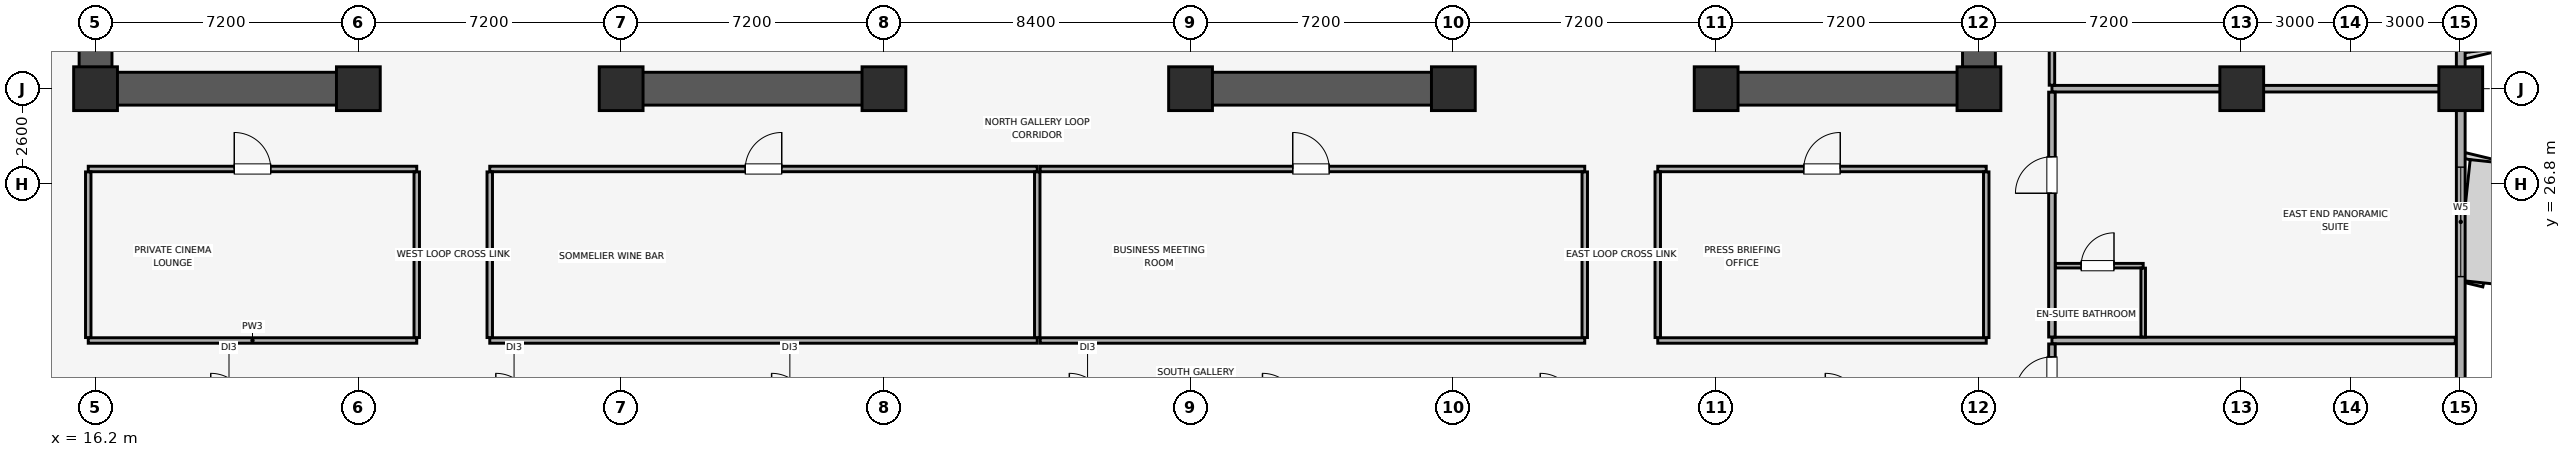
"""IFC4 building model, lengths in metres.
Left out: names, types, materials, properties, quantities, classifications, styles, units other than length and angle.
Written with IfcOpenShell. Run it as: python <this file> out.ifc"""

import sys

from ifc_helpers import new_model, si_unit, direction, frame, frame_2d, origin, origin_2d, place, context, subcontext, project, spatial, rectangle, extrude, element, fill, save


model = new_model("IFC4")
c1 = context("Model", 3, precision=1e-05, world=origin(), true_north=direction((0.0, 1.0)))
c2 = subcontext(c1, "Body", "Model", "MODEL_VIEW")
j1 = project(units=[si_unit("LENGTHUNIT", "METRE"), si_unit("PLANEANGLEUNIT", "RADIAN")], contexts=[c1])
p1 = place(None, origin())
s1 = spatial("IfcSite", under=j1, at=p1, CompositionType="ELEMENT")
p2 = place(p1, origin())
s2 = spatial("IfcBuilding", under=s1, at=p2, CompositionType="ELEMENT")
p3 = place(p2, frame((0.0, 0.0, 180.95)))
s3 = spatial("IfcBuildingStorey", under=s2, at=p3, CompositionType="ELEMENT", Elevation=180.95)
for number, where, z_axis, x_axis in (
    (1, (81.0, 29.4, 0.0), (0.0, 0.0, 1.0), (1.0, 0.0, 0.0)),
    (2, (16.2, 29.4, 0.0), (0.0, 0.0, 1.0), (1.0, 0.0, 0.0)),
    (3, (23.4, 29.4, 0.0), (0.0, 0.0, 1.0), (1.0, 0.0, 0.0)),
    (4, (30.6, 29.4, 0.0), (0.0, 0.0, 1.0), (1.0, 0.0, 0.0)),
    (5, (37.8, 29.4, 0.0), (0.0, 0.0, 1.0), (1.0, 0.0, 0.0)),
    (6, (46.2, 29.4, 0.0), (0.0, 0.0, 1.0), (1.0, 0.0, 0.0)),
    (7, (53.4, 29.4, 0.0), (0.0, 0.0, 1.0), (1.0, 0.0, 0.0)),
    (8, (60.6, 29.4, 0.0), (0.0, 0.0, 1.0), (1.0, 0.0, 0.0)),
    (9, (67.8, 29.4, 0.0), (0.0, 0.0, 1.0), (1.0, 0.0, 0.0)),
    (10, (75.0, 29.4, 0.0), (0.0, 0.0, 1.0), (1.0, 0.0, 0.0)),
):
    element("IfcColumn", number, at=place(p3, frame(where, z_axis=z_axis, x_axis=x_axis)), inside=s3, PredefinedType="COLUMN", context=c2, shape_type="SweptSolid", body=[
        extrude(rectangle(XDim=1.2, YDim=1.2, at=origin_2d()), origin(), (0.0, 0.0, 1.0), 3.45),
    ])
p4 = place(p3, frame((81.0, 7.0, 0.0), z_axis=(0.0, 0.0, 1.0), x_axis=(0.0, 1.0, 0.0)))
e11 = element("IfcWall", 11, at=p4, inside=s3, PredefinedType="SOLIDWALL", context=c2, shape_type="SweptSolid", body=[
    extrude(rectangle(XDim=38.0, YDim=0.24, at=frame_2d((19.0, 0.0))), origin(), (0.0, 0.0, 1.0), 2.65),
])
p5 = place(p4, frame((2.5, 0.0, 0.85)))
e12 = element("IfcOpeningElement", 12, at=p5, cuts=e11, PredefinedType="OPENING", context=c2, shape_type="SweptSolid", body=[
    extrude(rectangle(XDim=3.0, YDim=1.5, at=frame_2d((1.5, 0.75))), frame((0.0, 0.13, 0.0), z_axis=(0.0, -1.0, 0.0), x_axis=(1.0, 0.0, 0.0)), (0.0, 0.0, 1.0), 0.26),
])
p6 = place(p4, frame((10.45, 0.0, 0.85)))
e13 = element("IfcOpeningElement", 13, at=p6, cuts=e11, PredefinedType="OPENING", context=c2, shape_type="SweptSolid", body=[
    extrude(rectangle(XDim=3.0, YDim=1.5, at=frame_2d((1.5, 0.75))), frame((0.0, 0.13, 0.0), z_axis=(0.0, -1.0, 0.0), x_axis=(1.0, 0.0, 0.0)), (0.0, 0.0, 1.0), 0.26),
])
p7 = place(p4, frame((17.25, 0.0, 0.85)))
e14 = element("IfcOpeningElement", 14, at=p7, cuts=e11, PredefinedType="OPENING", context=c2, shape_type="SweptSolid", body=[
    extrude(rectangle(XDim=3.0, YDim=1.5, at=frame_2d((1.5, 0.75))), frame((0.0, 0.13, 0.0), z_axis=(0.0, -1.0, 0.0), x_axis=(1.0, 0.0, 0.0)), (0.0, 0.0, 1.0), 0.26),
])
p8 = place(p4, frame((23.615, 0.0, 0.85)))
e15 = element("IfcOpeningElement", 15, at=p8, cuts=e11, PredefinedType="OPENING", context=c2, shape_type="SweptSolid", body=[
    extrude(rectangle(XDim=3.0, YDim=1.5, at=frame_2d((1.5, 0.75))), frame((0.0, 0.13, 0.0), z_axis=(0.0, -1.0, 0.0), x_axis=(1.0, 0.0, 0.0)), (0.0, 0.0, 1.0), 0.26),
])
p9 = place(p4, frame((28.385, 0.0, 0.85)))
e16 = element("IfcOpeningElement", 16, at=p9, cuts=e11, PredefinedType="OPENING", context=c2, shape_type="SweptSolid", body=[
    extrude(rectangle(XDim=3.0, YDim=1.5, at=frame_2d((1.5, 0.75))), frame((0.0, 0.13, 0.0), z_axis=(0.0, -1.0, 0.0), x_axis=(1.0, 0.0, 0.0)), (0.0, 0.0, 1.0), 0.26),
])
p10 = place(p4, frame((33.915, 0.0, 0.85)))
e17 = element("IfcOpeningElement", 17, at=p10, cuts=e11, PredefinedType="OPENING", context=c2, shape_type="SweptSolid", body=[
    extrude(rectangle(XDim=3.0, YDim=1.5, at=frame_2d((1.5, 0.75))), frame((0.0, 0.13, 0.0), z_axis=(0.0, -1.0, 0.0), x_axis=(1.0, 0.0, 0.0)), (0.0, 0.0, 1.0), 0.26),
])
for number, where, z_axis, x_axis in (
    (18, (16.2, 29.4, 0.0), (0.0, 0.0, 1.0), (0.0, 1.0, 0.0)),
    (19, (67.8, 29.4, 0.0), (0.0, 0.0, 1.0), (0.0, 1.0, 0.0)),
):
    element("IfcWall", number, at=place(p3, frame(where, z_axis=z_axis, x_axis=x_axis)), inside=s3, PredefinedType="SHEAR", context=c2, shape_type="SweptSolid", body=[
        extrude(rectangle(XDim=19.2, YDim=0.9, at=frame_2d((9.6, 0.0))), origin(), (0.0, 0.0, 1.0), 3.45),
    ])
p11 = place(p3, frame((16.655, 29.4, 0.0), z_axis=(0.0, 0.0, 1.0), x_axis=(1.0, 0.0, 0.0)))
e20 = element("IfcWall", 20, at=p11, inside=s3, PredefinedType="SHEAR", context=c2, shape_type="SweptSolid", body=[
    extrude(rectangle(XDim=6.945, YDim=0.9, at=frame_2d((3.473, 0.0))), origin(), (0.0, 0.0, 1.0), 3.45),
])
for number, where, z_axis, x_axis in (
    (21, (30.4, 29.4, 0.0), (0.0, 0.0, 1.0), (1.0, 0.0, 0.0)),
    (22, (46.0, 29.4, 0.0), (0.0, 0.0, 1.0), (1.0, 0.0, 0.0)),
):
    element("IfcWall", number, at=place(p3, frame(where, z_axis=z_axis, x_axis=x_axis)), inside=s3, PredefinedType="SHEAR", context=c2, shape_type="SweptSolid", body=[
        extrude(rectangle(XDim=7.6, YDim=0.9, at=frame_2d((3.8, 0.0))), origin(), (0.0, 0.0, 1.0), 3.45),
    ])
p12 = place(p3, frame((60.4, 29.4, 0.0), z_axis=(0.0, 0.0, 1.0), x_axis=(1.0, 0.0, 0.0)))
e23 = element("IfcWall", 23, at=p12, inside=s3, PredefinedType="SHEAR", context=c2, shape_type="SweptSolid", body=[
    extrude(rectangle(XDim=6.945, YDim=0.9, at=frame_2d((3.473, 0.0))), origin(), (0.0, 0.0, 1.0), 3.45),
])
p13 = place(p3, frame((69.8, 22.5, 0.0), z_axis=(0.0, 0.0, 1.0), x_axis=(1.0, 0.0, 0.0)))
e24 = element("IfcWall", 24, at=p13, inside=s3, PredefinedType="PARTITIONING", context=c2, shape_type="SweptSolid", body=[
    extrude(rectangle(XDim=11.05, YDim=0.18, at=frame_2d((5.525, 0.0))), origin(), (0.0, 0.0, 1.0), 3.45),
])
p14 = place(p3, frame((69.8, 20.695, 0.0), z_axis=(0.0, 0.0, 1.0), x_axis=(0.0, 1.0, 0.0)))
e25 = element("IfcWall", 25, at=p14, inside=s3, PredefinedType="PARTITIONING", context=c2, shape_type="SweptSolid", body=[
    extrude(rectangle(XDim=1.71, YDim=0.18, at=frame_2d((0.855, 0.0))), origin(), (0.0, 0.0, 1.0), 3.45),
])
p15 = place(p14, frame((0.355, 0.0, 0.0)))
e26 = element("IfcOpeningElement", 26, at=p15, cuts=e25, PredefinedType="OPENING", context=c2, shape_type="SweptSolid", body=[
    extrude(rectangle(XDim=1.0, YDim=2.15, at=frame_2d((0.5, 1.075))), frame((0.0, 0.1, 0.0), z_axis=(0.0, -1.0, 0.0), x_axis=(1.0, 0.0, 0.0)), (0.0, 0.0, 1.0), 0.2),
])
p16 = place(p3, frame((69.8, 29.4, 0.0), z_axis=(0.0, 0.0, 1.0), x_axis=(1.0, 0.0, 0.0)))
e27 = element("IfcWall", 27, at=p16, inside=s3, PredefinedType="PARTITIONING", context=c2, shape_type="SweptSolid", body=[
    extrude(rectangle(XDim=11.05, YDim=0.18, at=frame_2d((5.525, 0.0))), origin(), (0.0, 0.0, 1.0), 2.54),
])
p17 = place(p3, frame((69.8, 22.595, 0.0), z_axis=(0.0, 0.0, 1.0), x_axis=(0.0, 1.0, 0.0)))
e28 = element("IfcWall", 28, at=p17, inside=s3, PredefinedType="PARTITIONING", context=c2, shape_type="SweptSolid", body=[
    extrude(rectangle(XDim=6.71, YDim=0.18, at=frame_2d((3.355, 0.0))), origin(), (0.0, 0.0, 1.0), 3.45),
])
p18 = place(p17, frame((3.94, 0.0, 0.0)))
e29 = element("IfcOpeningElement", 29, at=p18, cuts=e28, PredefinedType="OPENING", context=c2, shape_type="SweptSolid", body=[
    extrude(rectangle(XDim=1.0, YDim=2.15, at=frame_2d((0.5, 1.075))), frame((0.0, 0.1, 0.0), z_axis=(0.0, -1.0, 0.0), x_axis=(1.0, 0.0, 0.0)), (0.0, 0.0, 1.0), 0.2),
])
p19 = place(p3, frame((69.895, 24.55, 0.0), z_axis=(0.0, 0.0, 1.0), x_axis=(1.0, 0.0, 0.0)))
e30 = element("IfcWall", 30, at=p19, inside=s3, PredefinedType="PARTITIONING", context=c2, shape_type="SweptSolid", body=[
    extrude(rectangle(XDim=2.405, YDim=0.125, at=frame_2d((1.203, 0.0))), origin(), (0.0, 0.0, 1.0), 3.45),
])
p20 = place(p19, frame((0.705, 0.0, 0.0)))
e31 = element("IfcOpeningElement", 31, at=p20, cuts=e30, PredefinedType="OPENING", context=c2, shape_type="SweptSolid", body=[
    extrude(rectangle(XDim=0.9, YDim=2.1, at=frame_2d((0.45, 1.05))), frame((0.0, 0.073, 0.0), z_axis=(0.0, -1.0, 0.0), x_axis=(1.0, 0.0, 0.0)), (0.0, 0.0, 1.0), 0.145),
])
p21 = place(p3, frame((72.3, 22.595, 0.0), z_axis=(0.0, 0.0, 1.0), x_axis=(0.0, 1.0, 0.0)))
e32 = element("IfcWall", 32, at=p21, inside=s3, PredefinedType="PARTITIONING", context=c2, shape_type="SweptSolid", body=[
    extrude(rectangle(XDim=1.887, YDim=0.125, at=frame_2d((0.944, 0.0))), origin(), (0.0, 0.0, 1.0), 3.45),
])
p22 = place(p3, frame((16.0, 22.5, 0.0), z_axis=(0.0, 0.0, 1.0), x_axis=(1.0, 0.0, 0.0)))
e33 = element("IfcWall", 33, at=p22, inside=s3, PredefinedType="PARTITIONING", context=c2, shape_type="SweptSolid", body=[
    extrude(rectangle(XDim=9.0, YDim=0.15, at=frame_2d((4.5, 0.0))), origin(), (0.0, 0.0, 1.0), 3.45),
])
p23 = place(p3, frame((16.0, 27.2, 0.0), z_axis=(0.0, 0.0, 1.0), x_axis=(1.0, 0.0, 0.0)))
e34 = element("IfcWall", 34, at=p23, inside=s3, PredefinedType="PARTITIONING", context=c2, shape_type="SweptSolid", body=[
    extrude(rectangle(XDim=9.0, YDim=0.15, at=frame_2d((4.5, 0.0))), origin(), (0.0, 0.0, 1.0), 3.45),
])
p24 = place(p23, frame((4.0, 0.0, 0.0)))
e35 = element("IfcOpeningElement", 35, at=p24, cuts=e34, PredefinedType="OPENING", context=c2, shape_type="SweptSolid", body=[
    extrude(rectangle(XDim=1.0, YDim=2.15, at=frame_2d((0.5, 1.075))), frame((0.0, 0.085, 0.0), z_axis=(0.0, -1.0, 0.0), x_axis=(1.0, 0.0, 0.0)), (0.0, 0.0, 1.0), 0.17),
])
p25 = place(p3, frame((16.0, 22.58, 0.0), z_axis=(0.0, 0.0, 1.0), x_axis=(0.0, 1.0, 0.0)))
e36 = element("IfcWall", 36, at=p25, inside=s3, PredefinedType="PARTITIONING", context=c2, shape_type="SweptSolid", body=[
    extrude(rectangle(XDim=4.54, YDim=0.15, at=frame_2d((2.27, 0.0))), origin(), (0.0, 0.0, 1.0), 2.95),
])
p26 = place(p3, frame((25.0, 22.58, 0.0), z_axis=(0.0, 0.0, 1.0), x_axis=(0.0, 1.0, 0.0)))
e37 = element("IfcWall", 37, at=p26, inside=s3, PredefinedType="PARTITIONING", context=c2, shape_type="SweptSolid", body=[
    extrude(rectangle(XDim=4.54, YDim=0.15, at=frame_2d((2.27, 0.0))), origin(), (0.0, 0.0, 1.0), 3.45),
])
p27 = place(p3, frame((27.0, 22.5, 0.0), z_axis=(0.0, 0.0, 1.0), x_axis=(1.0, 0.0, 0.0)))
e38 = element("IfcWall", 38, at=p27, inside=s3, PredefinedType="PARTITIONING", context=c2, shape_type="SweptSolid", body=[
    extrude(rectangle(XDim=15.0, YDim=0.15, at=frame_2d((7.5, 0.0))), origin(), (0.0, 0.0, 1.0), 3.45),
])
p28 = place(p3, frame((27.0, 27.2, 0.0), z_axis=(0.0, 0.0, 1.0), x_axis=(1.0, 0.0, 0.0)))
e39 = element("IfcWall", 39, at=p28, inside=s3, PredefinedType="PARTITIONING", context=c2, shape_type="SweptSolid", body=[
    extrude(rectangle(XDim=15.0, YDim=0.15, at=frame_2d((7.5, 0.0))), origin(), (0.0, 0.0, 1.0), 3.45),
])
p29 = place(p28, frame((7.0, 0.0, 0.0)))
e40 = element("IfcOpeningElement", 40, at=p29, cuts=e39, PredefinedType="OPENING", context=c2, shape_type="SweptSolid", body=[
    extrude(rectangle(XDim=1.0, YDim=2.15, at=frame_2d((0.5, 1.075))), frame((0.0, 0.085, 0.0), z_axis=(0.0, -1.0, 0.0), x_axis=(1.0, 0.0, 0.0)), (0.0, 0.0, 1.0), 0.17),
])
for number, where, z_axis, x_axis in (
    (41, (27.0, 22.58, 0.0), (0.0, 0.0, 1.0), (0.0, 1.0, 0.0)),
    (42, (42.0, 22.58, 0.0), (0.0, 0.0, 1.0), (0.0, 1.0, 0.0)),
):
    element("IfcWall", number, at=place(p3, frame(where, z_axis=z_axis, x_axis=x_axis)), inside=s3, PredefinedType="PARTITIONING", context=c2, shape_type="SweptSolid", body=[
        extrude(rectangle(XDim=4.54, YDim=0.15, at=frame_2d((2.27, 0.0))), origin(), (0.0, 0.0, 1.0), 2.95),
    ])
p30 = place(p3, frame((42.08, 22.5, 0.0), z_axis=(0.0, 0.0, 1.0), x_axis=(1.0, 0.0, 0.0)))
e43 = element("IfcWall", 43, at=p30, inside=s3, PredefinedType="PARTITIONING", context=c2, shape_type="SweptSolid", body=[
    extrude(rectangle(XDim=14.92, YDim=0.15, at=frame_2d((7.46, 0.0))), origin(), (0.0, 0.0, 1.0), 3.45),
])
p31 = place(p3, frame((42.08, 27.2, 0.0), z_axis=(0.0, 0.0, 1.0), x_axis=(1.0, 0.0, 0.0)))
e44 = element("IfcWall", 44, at=p31, inside=s3, PredefinedType="PARTITIONING", context=c2, shape_type="SweptSolid", body=[
    extrude(rectangle(XDim=14.92, YDim=0.15, at=frame_2d((7.46, 0.0))), origin(), (0.0, 0.0, 1.0), 3.45),
])
p32 = place(p31, frame((6.92, 0.0, 0.0)))
e45 = element("IfcOpeningElement", 45, at=p32, cuts=e44, PredefinedType="OPENING", context=c2, shape_type="SweptSolid", body=[
    extrude(rectangle(XDim=1.0, YDim=2.15, at=frame_2d((0.5, 1.075))), frame((0.0, 0.085, 0.0), z_axis=(0.0, -1.0, 0.0), x_axis=(1.0, 0.0, 0.0)), (0.0, 0.0, 1.0), 0.17),
])
p33 = place(p3, frame((57.0, 22.58, 0.0), z_axis=(0.0, 0.0, 1.0), x_axis=(0.0, 1.0, 0.0)))
e46 = element("IfcWall", 46, at=p33, inside=s3, PredefinedType="PARTITIONING", context=c2, shape_type="SweptSolid", body=[
    extrude(rectangle(XDim=4.54, YDim=0.15, at=frame_2d((2.27, 0.0))), origin(), (0.0, 0.0, 1.0), 2.95),
])
p34 = place(p3, frame((59.0, 22.5, 0.0), z_axis=(0.0, 0.0, 1.0), x_axis=(1.0, 0.0, 0.0)))
e47 = element("IfcWall", 47, at=p34, inside=s3, PredefinedType="PARTITIONING", context=c2, shape_type="SweptSolid", body=[
    extrude(rectangle(XDim=9.0, YDim=0.15, at=frame_2d((4.5, 0.0))), origin(), (0.0, 0.0, 1.0), 3.45),
])
p35 = place(p3, frame((59.0, 27.2, 0.0), z_axis=(0.0, 0.0, 1.0), x_axis=(1.0, 0.0, 0.0)))
e48 = element("IfcWall", 48, at=p35, inside=s3, PredefinedType="PARTITIONING", context=c2, shape_type="SweptSolid", body=[
    extrude(rectangle(XDim=9.0, YDim=0.15, at=frame_2d((4.5, 0.0))), origin(), (0.0, 0.0, 1.0), 3.45),
])
p36 = place(p35, frame((4.0, 0.0, 0.0)))
e49 = element("IfcOpeningElement", 49, at=p36, cuts=e48, PredefinedType="OPENING", context=c2, shape_type="SweptSolid", body=[
    extrude(rectangle(XDim=1.0, YDim=2.15, at=frame_2d((0.5, 1.075))), frame((0.0, 0.085, 0.0), z_axis=(0.0, -1.0, 0.0), x_axis=(1.0, 0.0, 0.0)), (0.0, 0.0, 1.0), 0.17),
])
p37 = place(p3, frame((59.0, 22.58, 0.0), z_axis=(0.0, 0.0, 1.0), x_axis=(0.0, 1.0, 0.0)))
e50 = element("IfcWall", 50, at=p37, inside=s3, PredefinedType="PARTITIONING", context=c2, shape_type="SweptSolid", body=[
    extrude(rectangle(XDim=4.54, YDim=0.15, at=frame_2d((2.27, 0.0))), origin(), (0.0, 0.0, 1.0), 3.45),
])
p38 = place(p3, frame((68.0, 22.58, 0.0), z_axis=(0.0, 0.0, 1.0), x_axis=(0.0, 1.0, 0.0)))
e51 = element("IfcWall", 51, at=p38, inside=s3, PredefinedType="PARTITIONING", context=c2, shape_type="SweptSolid", body=[
    extrude(rectangle(XDim=4.54, YDim=0.15, at=frame_2d((2.27, 0.0))), origin(), (0.0, 0.0, 1.0), 2.95),
])
p39 = place(p3, frame((69.8, 29.495, 0.0), z_axis=(0.0, 0.0, 1.0), x_axis=(0.0, 1.0, 0.0)))
e52 = element("IfcWall", 52, at=p39, inside=s3, PredefinedType="PARTITIONING", context=c2, shape_type="SweptSolid", body=[
    extrude(rectangle(XDim=10.275, YDim=0.15, at=frame_2d((5.137, 0.0))), origin(), (0.0, 0.0, 1.0), 3.45),
])
p40 = place(p39, frame((4.625, 0.0, 0.0)))
e53 = element("IfcOpeningElement", 53, at=p40, cuts=e52, PredefinedType="OPENING", context=c2, shape_type="SweptSolid", body=[
    extrude(rectangle(XDim=1.0, YDim=2.15, at=frame_2d((0.5, 1.075))), frame((0.0, 0.085, 0.0), z_axis=(0.0, -1.0, 0.0), x_axis=(1.0, 0.0, 0.0)), (0.0, 0.0, 1.0), 0.17),
])
p41 = place(p7, origin())
e54 = element("IfcWindow", 54, at=p41, inside=s3, PartitioningType="SINGLE_PANEL", PredefinedType="WINDOW", context=c2, shape_type="SweptSolid", body=[
    extrude(rectangle(XDim=3.0, YDim=1.5, at=frame_2d((1.5, 0.75))), frame((0.0, 0.03, 0.0), z_axis=(0.0, -1.0, 0.0), x_axis=(1.0, 0.0, 0.0)), (0.0, 0.0, 1.0), 0.06),
])
fill(e14, e54)
p42 = place(p15, origin())
e55 = element("IfcDoor", 55, at=p42, inside=s3, OperationType="SINGLE_SWING_LEFT", PredefinedType="DOOR", context=c2, shape_type="SweptSolid", body=[
    extrude(rectangle(XDim=1.0, YDim=2.15, at=frame_2d((0.5, 1.075))), frame((0.0, 0.025, 0.0), z_axis=(0.0, -1.0, 0.0), x_axis=(1.0, 0.0, 0.0)), (0.0, 0.0, 1.0), 0.05),
])
fill(e26, e55)
p43 = place(p18, origin())
e56 = element("IfcDoor", 56, at=p43, inside=s3, OperationType="SINGLE_SWING_LEFT", PredefinedType="DOOR", context=c2, shape_type="SweptSolid", body=[
    extrude(rectangle(XDim=1.0, YDim=2.15, at=frame_2d((0.5, 1.075))), frame((0.0, 0.025, 0.0), z_axis=(0.0, -1.0, 0.0), x_axis=(1.0, 0.0, 0.0)), (0.0, 0.0, 1.0), 0.05),
])
fill(e29, e56)
p44 = place(p20, origin())
e57 = element("IfcDoor", 57, at=p44, inside=s3, OperationType="SINGLE_SWING_RIGHT", PredefinedType="DOOR", context=c2, shape_type="SweptSolid", body=[
    extrude(rectangle(XDim=0.9, YDim=2.1, at=frame_2d((0.45, 1.05))), frame((0.0, 0.025, 0.0), z_axis=(0.0, -1.0, 0.0), x_axis=(1.0, 0.0, 0.0)), (0.0, 0.0, 1.0), 0.05),
])
fill(e31, e57)
p45 = place(p24, origin())
e58 = element("IfcDoor", 58, at=p45, inside=s3, OperationType="SINGLE_SWING_LEFT", PredefinedType="DOOR", context=c2, shape_type="SweptSolid", body=[
    extrude(rectangle(XDim=1.0, YDim=2.15, at=frame_2d((0.5, 1.075))), frame((0.0, 0.025, 0.0), z_axis=(0.0, -1.0, 0.0), x_axis=(1.0, 0.0, 0.0)), (0.0, 0.0, 1.0), 0.05),
])
fill(e35, e58)
p46 = place(p29, origin())
e59 = element("IfcDoor", 59, at=p46, inside=s3, OperationType="SINGLE_SWING_RIGHT", PredefinedType="DOOR", context=c2, shape_type="SweptSolid", body=[
    extrude(rectangle(XDim=1.0, YDim=2.15, at=frame_2d((0.5, 1.075))), frame((0.0, 0.025, 0.0), z_axis=(0.0, -1.0, 0.0), x_axis=(1.0, 0.0, 0.0)), (0.0, 0.0, 1.0), 0.05),
])
fill(e40, e59)
p47 = place(p32, origin())
e60 = element("IfcDoor", 60, at=p47, inside=s3, OperationType="SINGLE_SWING_LEFT", PredefinedType="DOOR", context=c2, shape_type="SweptSolid", body=[
    extrude(rectangle(XDim=1.0, YDim=2.15, at=frame_2d((0.5, 1.075))), frame((0.0, 0.025, 0.0), z_axis=(0.0, -1.0, 0.0), x_axis=(1.0, 0.0, 0.0)), (0.0, 0.0, 1.0), 0.05),
])
fill(e45, e60)
p48 = place(p36, origin())
e61 = element("IfcDoor", 61, at=p48, inside=s3, OperationType="SINGLE_SWING_RIGHT", PredefinedType="DOOR", context=c2, shape_type="SweptSolid", body=[
    extrude(rectangle(XDim=1.0, YDim=2.15, at=frame_2d((0.5, 1.075))), frame((0.0, 0.025, 0.0), z_axis=(0.0, -1.0, 0.0), x_axis=(1.0, 0.0, 0.0)), (0.0, 0.0, 1.0), 0.05),
])
fill(e49, e61)
save(model, sys.argv[1])
